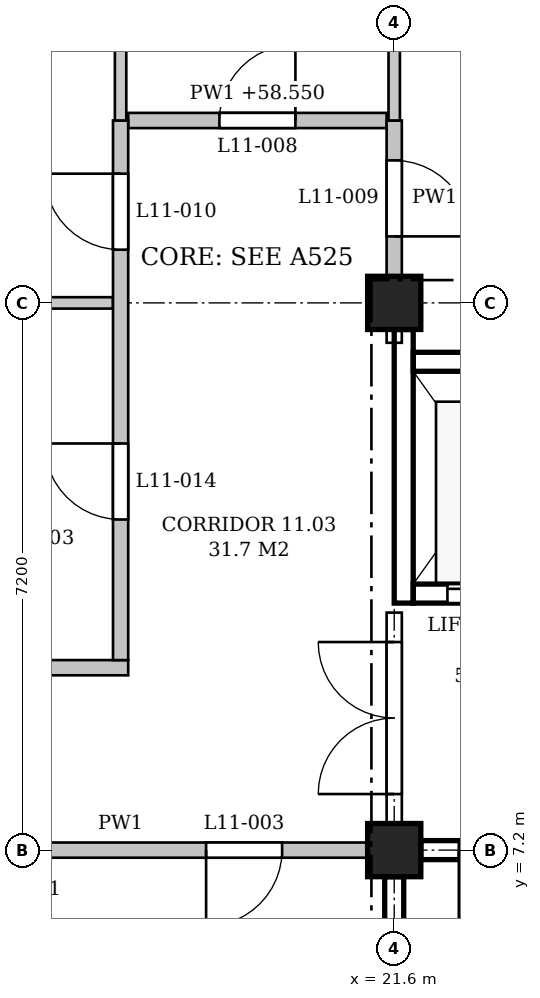
"""IFC4 building model, lengths in metres.
Left out: names, types, materials, properties, quantities, classifications, styles, units other than length and angle.
Written with IfcOpenShell. Run it as: python <this file> out.ifc"""

import sys

from ifc_helpers import new_model, si_unit, direction, frame, frame_2d, origin, origin_2d, place, context, subcontext, project, spatial, polyline, rectangle, outline, extrude, element, fill, save


model = new_model("IFC4")
c1 = context("Model", 3, precision=1e-05, world=origin(), true_north=direction((0.0, 1.0)))
c2 = subcontext(c1, "Body", "Model", "MODEL_VIEW")
j1 = project(units=[si_unit("LENGTHUNIT", "METRE"), si_unit("PLANEANGLEUNIT", "RADIAN")], contexts=[c1])
p1 = place(None, origin())
s1 = spatial("IfcSite", under=j1, at=p1, CompositionType="ELEMENT")
p2 = place(p1, origin())
s2 = spatial("IfcBuilding", under=s1, at=p2, CompositionType="ELEMENT")
p3 = place(p2, frame((0.0, 0.0, 54.3)))
s3 = spatial("IfcBuildingStorey", under=s2, at=p3, CompositionType="ELEMENT", Elevation=54.3)
for number, where, z_axis, x_axis in (
    (1, (21.6, 7.2, 0.0), (0.0, 0.0, 1.0), (1.0, 0.0, 0.0)),
    (2, (21.6, 14.4, 0.0), (0.0, 0.0, 1.0), (1.0, 0.0, 0.0)),
):
    element("IfcColumn", number, at=place(p3, frame(where, z_axis=z_axis, x_axis=x_axis)), inside=s3, PredefinedType="COLUMN", context=c2, shape_type="SweptSolid", body=[
        extrude(rectangle(XDim=0.7, YDim=0.7, at=origin_2d()), origin(), (0.0, 0.0, 1.0), 4.5),
    ])
p4 = place(p3, frame((21.95, 7.2, 0.0), z_axis=(0.0, 0.0, 1.0), x_axis=(1.0, 0.0, 0.0)))
e3 = element("IfcWall", 3, at=p4, inside=s3, PredefinedType="SHEAR", context=c2, shape_type="SweptSolid", body=[
    extrude(rectangle(XDim=6.5, YDim=0.25, at=frame_2d((3.25, 0.0))), origin(), (0.0, 0.0, 1.0), 3.55),
])
p5 = place(p4, frame((0.5, 0.0, 0.0)))
e4 = element("IfcOpeningElement", 4, at=p5, cuts=e3, PredefinedType="OPENING", context=c2, shape_type="SweptSolid", body=[
    extrude(rectangle(XDim=1.1, YDim=2.1, at=frame_2d((0.55, 1.05))), frame((0.0, 0.135, 0.0), z_axis=(0.0, -1.0, 0.0), x_axis=(1.0, 0.0, 0.0)), (0.0, 0.0, 1.0), 0.27),
])
p6 = place(p3, frame((21.6, 0.35, 0.0), z_axis=(0.0, 0.0, 1.0), x_axis=(0.0, 1.0, 0.0)))
e5 = element("IfcWall", 5, at=p6, inside=s3, PredefinedType="SHEAR", context=c2, shape_type="SweptSolid", body=[
    extrude(rectangle(XDim=6.5, YDim=0.25, at=frame_2d((3.25, 0.0))), origin(), (0.0, 0.0, 1.0), 3.55),
])
p7 = place(p3, frame((21.725, 10.45, -0.25), z_axis=(0.0, 0.0, 1.0), x_axis=(0.0, 1.0, 0.0)))
e6 = element("IfcWall", 6, at=p7, inside=s3, PredefinedType="SHEAR", context=c2, shape_type="SweptSolid", body=[
    extrude(rectangle(XDim=3.6, YDim=0.25, at=frame_2d((1.8, 0.0))), origin(), (0.0, 0.0, 1.0), 3.8),
])
p8 = place(p3, frame((21.85, 10.575, -0.25), z_axis=(0.0, 0.0, 1.0), x_axis=(1.0, 0.0, 0.0)))
e7 = element("IfcWall", 7, at=p8, inside=s3, PredefinedType="SHEAR", context=c2, shape_type="SweptSolid", body=[
    extrude(rectangle(XDim=2.0, YDim=0.25, at=frame_2d((1.0, 0.0))), origin(), (0.0, 0.0, 1.0), 4.5),
])
p9 = place(p8, frame((0.45, 0.0, 0.25)))
e8 = element("IfcOpeningElement", 8, at=p9, cuts=e7, PredefinedType="OPENING", context=c2, shape_type="SweptSolid", body=[
    extrude(rectangle(XDim=1.1, YDim=2.1, at=frame_2d((0.55, 1.05))), frame((0.0, 0.135, 0.0), z_axis=(0.0, -1.0, 0.0), x_axis=(1.0, 0.0, 0.0)), (0.0, 0.0, 1.0), 0.27),
])
p10 = place(p3, frame((21.85, 13.625, -0.25), z_axis=(0.0, 0.0, 1.0), x_axis=(1.0, 0.0, 0.0)))
e9 = element("IfcWall", 9, at=p10, inside=s3, PredefinedType="SHEAR", context=c2, shape_type="SweptSolid", body=[
    extrude(rectangle(XDim=2.0, YDim=0.25, at=frame_2d((1.0, 0.0))), origin(), (0.0, 0.0, 1.0), 4.5),
])
p11 = place(p3, frame((14.75, 7.2, 0.0), z_axis=(0.0, 0.0, 1.0), x_axis=(1.0, 0.0, 0.0)))
e10 = element("IfcWall", 10, at=p11, inside=s3, PredefinedType="PARTITIONING", context=c2, shape_type="SweptSolid", body=[
    extrude(rectangle(XDim=6.5, YDim=0.2, at=frame_2d((3.25, 0.0))), origin(), (0.0, 0.0, 1.0), 3.55),
])
p12 = place(p11, frame((4.375, 0.0, 0.0)))
e11 = element("IfcOpeningElement", 11, at=p12, cuts=e10, PredefinedType="OPENING", context=c2, shape_type="SweptSolid", body=[
    extrude(rectangle(XDim=1.0, YDim=2.1, at=frame_2d((0.5, 1.05))), frame((0.0, 0.11, 0.0), z_axis=(0.0, -1.0, 0.0), x_axis=(1.0, 0.0, 0.0)), (0.0, 0.0, 1.0), 0.22),
])
p13 = place(p3, frame((3.5, 9.6, 0.0), z_axis=(0.0, 0.0, 1.0), x_axis=(1.0, 0.0, 0.0)))
e12 = element("IfcWall", 12, at=p13, inside=s3, PredefinedType="PARTITIONING", context=c2, shape_type="SweptSolid", body=[
    extrude(outline(polyline([(0.0, 0.0), (14.6, 0.0), (14.6, 4.25), (11.125, 4.25), (11.125, 3.55), (10.675, 3.55), (10.675, 4.25), (3.925, 4.25), (3.925, 3.55), (3.475, 3.55), (3.475, 4.25), (0.0, 4.25), (0.0, 0.0)])), frame((0.0, 0.1, 0.0), z_axis=(0.0, -1.0, 0.0), x_axis=(1.0, 0.0, 0.0)), (0.0, 0.0, 1.0), 0.2),
])
p14 = place(p13, frame((2.7, 0.0, 0.0)))
e13 = element("IfcOpeningElement", 13, at=p14, cuts=e12, PredefinedType="OPENING", context=c2, shape_type="SweptSolid", body=[
    extrude(rectangle(XDim=2.0, YDim=2.1, at=frame_2d((1.0, 1.05))), frame((0.0, 0.11, 0.0), z_axis=(0.0, -1.0, 0.0), x_axis=(1.0, 0.0, 0.0)), (0.0, 0.0, 1.0), 0.22),
])
p15 = place(p13, frame((8.6, 0.0, 0.0)))
e14 = element("IfcOpeningElement", 14, at=p15, cuts=e12, PredefinedType="OPENING", context=c2, shape_type="SweptSolid", body=[
    extrude(rectangle(XDim=1.0, YDim=2.1, at=frame_2d((0.5, 1.05))), frame((0.0, 0.11, 0.0), z_axis=(0.0, -1.0, 0.0), x_axis=(1.0, 0.0, 0.0)), (0.0, 0.0, 1.0), 0.22),
])
p16 = place(p3, frame((14.75, 14.4, 0.0), z_axis=(0.0, 0.0, 1.0), x_axis=(1.0, 0.0, 0.0)))
e15 = element("IfcWall", 15, at=p16, inside=s3, PredefinedType="PARTITIONING", context=c2, shape_type="SweptSolid", body=[
    extrude(rectangle(XDim=3.15, YDim=0.15, at=frame_2d((1.575, 0.0))), origin(), (0.0, 0.0, 1.0), 3.55),
])
p17 = place(p3, frame((18.1, 16.8, 0.0), z_axis=(0.0, 0.0, 1.0), x_axis=(1.0, 0.0, 0.0)))
e16 = element("IfcWall", 16, at=p17, inside=s3, PredefinedType="PARTITIONING", context=c2, shape_type="SweptSolid", body=[
    extrude(outline(polyline([(0.0, 0.0), (3.4, 0.0), (3.4, 3.55), (3.275, 3.55), (3.275, 4.25), (0.0, 4.25), (0.0, 0.0)])), frame((0.0, 0.1, 0.0), z_axis=(0.0, -1.0, 0.0), x_axis=(1.0, 0.0, 0.0)), (0.0, 0.0, 1.0), 0.2),
])
p18 = place(p17, frame((1.2, 0.0, 0.0)))
e17 = element("IfcOpeningElement", 17, at=p18, cuts=e16, PredefinedType="OPENING", context=c2, shape_type="SweptSolid", body=[
    extrude(rectangle(XDim=1.0, YDim=2.1, at=frame_2d((0.5, 1.05))), frame((0.0, 0.11, 0.0), z_axis=(0.0, -1.0, 0.0), x_axis=(1.0, 0.0, 0.0)), (0.0, 0.0, 1.0), 0.22),
])
p19 = place(p3, frame((18.0, 9.7, 0.0), z_axis=(0.0, 0.0, 1.0), x_axis=(0.0, 1.0, 0.0)))
e18 = element("IfcWall", 18, at=p19, inside=s3, PredefinedType="PARTITIONING", context=c2, shape_type="SweptSolid", body=[
    extrude(outline(polyline([(0.0, 0.0), (7.1, 0.0), (7.1, 4.25), (4.925, 4.25), (4.925, 3.55), (4.475, 3.55), (4.475, 4.25), (0.0, 4.25), (0.0, 0.0)])), frame((0.0, 0.1, 0.0), z_axis=(0.0, -1.0, 0.0), x_axis=(1.0, 0.0, 0.0)), (0.0, 0.0, 1.0), 0.2),
])
p20 = place(p19, frame((5.4, 0.0, 0.0)))
e19 = element("IfcOpeningElement", 19, at=p20, cuts=e18, PredefinedType="OPENING", context=c2, shape_type="SweptSolid", body=[
    extrude(rectangle(XDim=1.0, YDim=2.1, at=frame_2d((0.5, 1.05))), frame((0.0, 0.11, 0.0), z_axis=(0.0, -1.0, 0.0), x_axis=(1.0, 0.0, 0.0)), (0.0, 0.0, 1.0), 0.22),
])
p21 = place(p19, frame((1.85, 0.0, 0.0)))
e20 = element("IfcOpeningElement", 20, at=p21, cuts=e18, PredefinedType="OPENING", context=c2, shape_type="SweptSolid", body=[
    extrude(rectangle(XDim=1.0, YDim=2.1, at=frame_2d((0.5, 1.05))), frame((0.0, 0.11, 0.0), z_axis=(0.0, -1.0, 0.0), x_axis=(1.0, 0.0, 0.0)), (0.0, 0.0, 1.0), 0.22),
])
p22 = place(p3, frame((18.0, 16.8, 0.0), z_axis=(0.0, 0.0, 1.0), x_axis=(0.0, 1.0, 0.0)))
e21 = element("IfcWall", 21, at=p22, inside=s3, PredefinedType="PARTITIONING", context=c2, shape_type="SweptSolid", body=[
    extrude(rectangle(XDim=4.65, YDim=0.15, at=frame_2d((2.325, 0.0))), origin(), (0.0, 0.0, 1.0), 3.55),
])
p23 = place(p3, frame((21.6, 7.55, 0.0), z_axis=(0.0, 0.0, 1.0), x_axis=(0.0, 1.0, 0.0)))
e22 = element("IfcWall", 22, at=p23, inside=s3, PredefinedType="PARTITIONING", context=c2, shape_type="SweptSolid", body=[
    extrude(rectangle(XDim=2.775, YDim=0.2, at=frame_2d((1.387, 0.0))), origin(), (0.0, 0.0, 1.0), 3.55),
])
p24 = place(p23, frame((0.387, 0.0, 0.0)))
e23 = element("IfcOpeningElement", 23, at=p24, cuts=e22, PredefinedType="OPENING", context=c2, shape_type="SweptSolid", body=[
    extrude(rectangle(XDim=2.0, YDim=2.4, at=frame_2d((1.0, 1.2))), frame((0.0, 0.11, 0.0), z_axis=(0.0, -1.0, 0.0), x_axis=(1.0, 0.0, 0.0)), (0.0, 0.0, 1.0), 0.22),
])
p25 = place(p3, frame((21.6, 13.875, 0.0), z_axis=(0.0, 0.0, 1.0), x_axis=(0.0, 1.0, 0.0)))
e24 = element("IfcWall", 24, at=p25, inside=s3, PredefinedType="PARTITIONING", context=c2, shape_type="SweptSolid", body=[
    extrude(rectangle(XDim=0.175, YDim=0.2, at=frame_2d((0.087, 0.0))), origin(), (0.0, 0.0, 1.0), 3.55),
])
p26 = place(p3, frame((21.6, 14.75, 0.0), z_axis=(0.0, 0.0, 1.0), x_axis=(0.0, 1.0, 0.0)))
e25 = element("IfcWall", 25, at=p26, inside=s3, PredefinedType="PARTITIONING", context=c2, shape_type="SweptSolid", body=[
    extrude(rectangle(XDim=2.05, YDim=0.2, at=frame_2d((1.025, 0.0))), origin(), (0.0, 0.0, 1.0), 3.55),
])
p27 = place(p26, frame((0.525, 0.0, 0.0)))
e26 = element("IfcOpeningElement", 26, at=p27, cuts=e25, PredefinedType="OPENING", context=c2, shape_type="SweptSolid", body=[
    extrude(rectangle(XDim=1.0, YDim=2.1, at=frame_2d((0.5, 1.05))), frame((0.0, 0.11, 0.0), z_axis=(0.0, -1.0, 0.0), x_axis=(1.0, 0.0, 0.0)), (0.0, 0.0, 1.0), 0.22),
])
p28 = place(p3, frame((21.6, 16.8, 0.0), z_axis=(0.0, 0.0, 1.0), x_axis=(0.0, 1.0, 0.0)))
e27 = element("IfcWall", 27, at=p28, inside=s3, PredefinedType="PARTITIONING", context=c2, shape_type="SweptSolid", body=[
    extrude(rectangle(XDim=4.45, YDim=0.15, at=frame_2d((2.225, 0.0))), origin(), (0.0, 0.0, 1.0), 3.55),
])
p29 = place(p5, frame((1.1, 0.0, 0.0), z_axis=(0.0, 0.0, 1.0), x_axis=(-1.0, 0.0, 0.0)))
e28 = element("IfcDoor", 28, at=p29, inside=s3, OperationType="SINGLE_SWING_RIGHT", PredefinedType="DOOR", context=c2, shape_type="SweptSolid", body=[
    extrude(rectangle(XDim=1.1, YDim=2.1, at=frame_2d((0.55, 1.05))), frame((0.0, 0.025, 0.0), z_axis=(0.0, -1.0, 0.0), x_axis=(1.0, 0.0, 0.0)), (0.0, 0.0, 1.0), 0.05),
])
fill(e4, e28)
p30 = place(p9, origin())
e29 = element("IfcDoor", 29, at=p30, inside=s3, OperationType="SLIDING_TO_LEFT", PredefinedType="DOOR", context=c2, shape_type="SweptSolid", body=[
    extrude(rectangle(XDim=1.1, YDim=2.1, at=frame_2d((0.55, 1.05))), frame((0.0, 0.025, 0.0), z_axis=(0.0, -1.0, 0.0), x_axis=(1.0, 0.0, 0.0)), (0.0, 0.0, 1.0), 0.05),
])
fill(e8, e29)
p31 = place(p24, origin())
e30 = element("IfcDoor", 30, at=p31, inside=s3, OperationType="DOUBLE_DOOR_SINGLE_SWING", PredefinedType="DOOR", context=c2, shape_type="SweptSolid", body=[
    extrude(rectangle(XDim=2.0, YDim=2.4, at=frame_2d((1.0, 1.2))), frame((0.0, 0.025, 0.0), z_axis=(0.0, -1.0, 0.0), x_axis=(1.0, 0.0, 0.0)), (0.0, 0.0, 1.0), 0.05),
])
fill(e23, e30)
p32 = place(p12, frame((1.0, 0.0, 0.0), z_axis=(0.0, 0.0, 1.0), x_axis=(-1.0, 0.0, 0.0)))
e31 = element("IfcDoor", 31, at=p32, inside=s3, OperationType="SINGLE_SWING_RIGHT", PredefinedType="DOOR", context=c2, shape_type="SweptSolid", body=[
    extrude(rectangle(XDim=1.0, YDim=2.1, at=frame_2d((0.5, 1.05))), frame((0.0, 0.025, 0.0), z_axis=(0.0, -1.0, 0.0), x_axis=(1.0, 0.0, 0.0)), (0.0, 0.0, 1.0), 0.05),
])
fill(e11, e31)
p33 = place(p18, origin())
e32 = element("IfcDoor", 32, at=p33, inside=s3, OperationType="SINGLE_SWING_RIGHT", PredefinedType="DOOR", context=c2, shape_type="SweptSolid", body=[
    extrude(rectangle(XDim=1.0, YDim=2.1, at=frame_2d((0.5, 1.05))), frame((0.0, 0.025, 0.0), z_axis=(0.0, -1.0, 0.0), x_axis=(1.0, 0.0, 0.0)), (0.0, 0.0, 1.0), 0.05),
])
fill(e17, e32)
p34 = place(p27, frame((1.0, 0.0, 0.0), z_axis=(0.0, 0.0, 1.0), x_axis=(-1.0, 0.0, 0.0)))
e33 = element("IfcDoor", 33, at=p34, inside=s3, OperationType="SINGLE_SWING_RIGHT", PredefinedType="DOOR", context=c2, shape_type="SweptSolid", body=[
    extrude(rectangle(XDim=1.0, YDim=2.1, at=frame_2d((0.5, 1.05))), frame((0.0, 0.025, 0.0), z_axis=(0.0, -1.0, 0.0), x_axis=(1.0, 0.0, 0.0)), (0.0, 0.0, 1.0), 0.05),
])
fill(e26, e33)
p35 = place(p20, origin())
e34 = element("IfcDoor", 34, at=p35, inside=s3, OperationType="SINGLE_SWING_RIGHT", PredefinedType="DOOR", context=c2, shape_type="SweptSolid", body=[
    extrude(rectangle(XDim=1.0, YDim=2.1, at=frame_2d((0.5, 1.05))), frame((0.0, 0.025, 0.0), z_axis=(0.0, -1.0, 0.0), x_axis=(1.0, 0.0, 0.0)), (0.0, 0.0, 1.0), 0.05),
])
fill(e19, e34)
p36 = place(p21, origin())
e35 = element("IfcDoor", 35, at=p36, inside=s3, OperationType="SINGLE_SWING_RIGHT", PredefinedType="DOOR", context=c2, shape_type="SweptSolid", body=[
    extrude(rectangle(XDim=1.0, YDim=2.1, at=frame_2d((0.5, 1.05))), frame((0.0, 0.025, 0.0), z_axis=(0.0, -1.0, 0.0), x_axis=(1.0, 0.0, 0.0)), (0.0, 0.0, 1.0), 0.05),
])
fill(e20, e35)
save(model, sys.argv[1])
